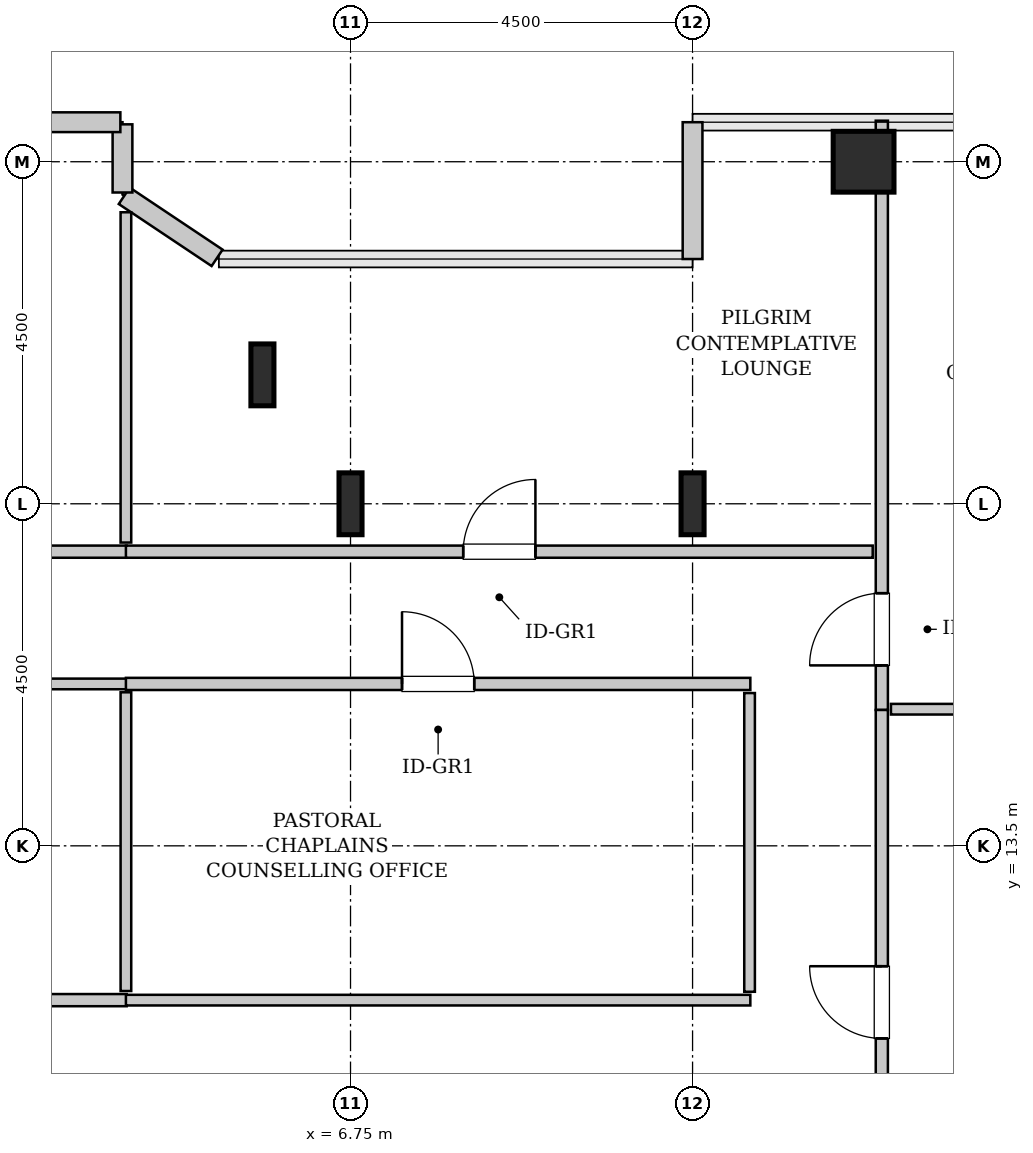
"""IFC4 building model, lengths in metres.
Left out: names, types, materials, properties, quantities, classifications, styles, units other than length and angle.
Written with IfcOpenShell. Run it as: python <this file> out.ifc"""

import sys

from ifc_helpers import new_model, si_unit, direction, frame, frame_2d, origin, origin_2d, place, context, subcontext, project, spatial, rectangle, hollow_rectangle, i_section, extrude, source, transform, mapped, element, fill, save


model = new_model("IFC4")
c1 = context("Model", 3, precision=1e-05, world=origin(), true_north=direction((0.0, 1.0)))
c2 = subcontext(c1, "Body", "Model", "MODEL_VIEW")
j1 = project(units=[si_unit("LENGTHUNIT", "METRE"), si_unit("PLANEANGLEUNIT", "RADIAN")], contexts=[c1])
p1 = place(None, origin())
s1 = spatial("IfcSite", under=j1, at=p1, CompositionType="ELEMENT")
p2 = place(p1, origin())
s2 = spatial("IfcBuilding", under=s1, at=p2, CompositionType="ELEMENT")
p3 = place(p2, frame((0.0, 0.0, 198.2)))
s3 = spatial("IfcBuildingStorey", under=s2, at=p3, CompositionType="ELEMENT", Elevation=198.2)
m1 = source(origin(), c2, "Body", "SweptSolid", [
    extrude(i_section(OverallWidth=0.303, OverallDepth=0.814, WebThickness=0.021, FlangeThickness=0.04, FilletRadius=0.03, at=origin_2d()), origin(), (0.0, 0.0, 1.0), 3.8),
])
for number, where, z_axis, x_axis in (
    (1, (5.591, 19.696, 0.0), (0.0, 0.0, 1.0), (1.0, 0.0, 0.0)),
    (2, (6.75, 18.0, 0.0), (0.0, 0.0, 1.0), (1.0, 0.0, 0.0)),
    (3, (11.25, 18.0, 0.0), (0.0, 0.0, 1.0), (1.0, 0.0, 0.0)),
):
    element("IfcColumn", number, at=place(p3, frame(where, z_axis=z_axis, x_axis=x_axis)), inside=s3, PredefinedType="COLUMN", context=c2, shape_type="MappedRepresentation", body=[
        mapped(m1, transform((0.0, 0.0, 0.0), x_axis=(1.0, 0.0, 0.0), y_axis=(0.0, 1.0, 0.0), z_axis=(0.0, 0.0, 1.0), scale=1.0)),
    ])
m2 = source(origin(), c2, "Body", "SweptSolid", [
    extrude(hollow_rectangle(XDim=0.8, YDim=0.8, WallThickness=0.04, InnerFilletRadius=0.04, OuterFilletRadius=0.08, at=origin_2d()), origin(), (0.0, 0.0, 1.0), 3.8),
])
p4 = place(p3, frame((13.5, 22.5, 0.0), z_axis=(0.0, 0.0, 1.0), x_axis=(1.0, 0.0, 0.0)))
e4 = element("IfcColumn", 4, at=p4, inside=s3, PredefinedType="COLUMN", context=c2, shape_type="MappedRepresentation", body=[
    mapped(m2, transform((0.0, 0.0, 0.0), x_axis=(1.0, 0.0, 0.0), y_axis=(0.0, 1.0, 0.0), z_axis=(0.0, 0.0, 1.0), scale=1.0)),
])
m3 = source(origin(), c2, "Body", "SweptSolid", [
    extrude(rectangle(XDim=1.8, YDim=0.26, at=frame_2d((0.9, 0.0))), origin(), (0.0, 0.0, 1.0), 3.5),
])
p5 = place(p3, frame((11.25, 23.02, 0.0), z_axis=(0.0, 0.0, 1.0), x_axis=(0.0, -1.0, 0.0)))
e5 = element("IfcWall", 5, at=p5, inside=s3, PredefinedType="SOLIDWALL", context=c2, shape_type="MappedRepresentation", body=[
    mapped(m3, transform((0.0, 0.0, 0.0), x_axis=(1.0, 0.0, 0.0), y_axis=(0.0, 1.0, 0.0), z_axis=(0.0, 0.0, 1.0), scale=1.0)),
])
m4 = source(origin(), c2, "Body", "SweptSolid", [
    extrude(rectangle(XDim=1.469, YDim=0.26, at=frame_2d((0.734, 0.0))), origin(), (0.0, 0.0, 1.0), 3.5),
])
p6 = place(p3, frame((4.995, 21.236, 0.0), z_axis=(0.0, 0.0, 1.0), x_axis=(-0.831461760506, 0.555581983884, 0.0)))
e6 = element("IfcWall", 6, at=p6, inside=s3, PredefinedType="SOLIDWALL", context=c2, shape_type="MappedRepresentation", body=[
    mapped(m4, transform((0.0, 0.0, 0.0), x_axis=(1.0, 0.0, 0.0), y_axis=(0.0, 1.0, 0.0), z_axis=(0.0, 0.0, 1.0), scale=1.0)),
])
m5 = source(origin(), c2, "Body", "SweptSolid", [
    extrude(rectangle(XDim=0.897, YDim=0.26, at=frame_2d((0.448, 0.0))), origin(), (0.0, 0.0, 1.0), 3.5),
])
p7 = place(p3, frame((3.75, 22.095, 0.0), z_axis=(0.0, 0.0, 1.0), x_axis=(0.0, 1.0, 0.0)))
e7 = element("IfcWall", 7, at=p7, inside=s3, PredefinedType="SOLIDWALL", context=c2, shape_type="MappedRepresentation", body=[
    mapped(m5, transform((0.0, 0.0, 0.0), x_axis=(1.0, 0.0, 0.0), y_axis=(0.0, 1.0, 0.0), z_axis=(0.0, 0.0, 1.0), scale=1.0)),
])
m6 = source(origin(), c2, "Body", "SweptSolid", [
    extrude(rectangle(XDim=1.37, YDim=0.26, at=frame_2d((0.685, 0.0))), origin(), (0.0, 0.0, 1.0), 3.5),
])
p8 = place(p3, frame((3.722, 23.02, 0.0), z_axis=(0.0, 0.0, 1.0), x_axis=(-1.0, 0.0, 0.0)))
e8 = element("IfcWall", 8, at=p8, inside=s3, PredefinedType="SOLIDWALL", context=c2, shape_type="MappedRepresentation", body=[
    mapped(m6, transform((0.0, 0.0, 0.0), x_axis=(1.0, 0.0, 0.0), y_axis=(0.0, 1.0, 0.0), z_axis=(0.0, 0.0, 1.0), scale=1.0)),
])
m7 = source(origin(), c2, "Body", "SweptSolid", [
    extrude(rectangle(XDim=7.752, YDim=0.16, at=frame_2d((3.876, 0.0))), origin(), (0.0, 0.0, 1.0), 3.485),
])
p9 = place(p3, frame((13.74, 15.288, 0.0), z_axis=(0.0, 0.0, 1.0), x_axis=(0.0, 1.0, 0.0)))
e9 = element("IfcWall", 9, at=p9, inside=s3, PredefinedType="PARTITIONING", context=c2, shape_type="MappedRepresentation", body=[
    mapped(m7, transform((0.0, 0.0, 0.0), x_axis=(1.0, 0.0, 0.0), y_axis=(0.0, 1.0, 0.0), z_axis=(0.0, 0.0, 1.0), scale=1.0)),
])
p10 = place(p9, frame((0.586, 0.0, 0.0)))
e10 = element("IfcOpeningElement", 10, at=p10, cuts=e9, PredefinedType="OPENING", context=c2, shape_type="SweptSolid", body=[
    extrude(rectangle(XDim=0.95, YDim=2.1, at=frame_2d((0.475, 1.05))), frame((0.0, 0.09, 0.0), z_axis=(0.0, -1.0, 0.0), x_axis=(1.0, 0.0, 0.0)), (0.0, 0.0, 1.0), 0.18),
])
m8 = source(origin(), c2, "Body", "SweptSolid", [
    extrude(rectangle(XDim=11.43, YDim=0.14, at=frame_2d((5.715, 0.0))), origin(), (0.0, 0.0, 1.0), 3.485),
])
p11 = place(p3, frame((13.86, 15.298, 0.0), z_axis=(0.0, 0.0, 1.0), x_axis=(1.0, 0.0, 0.0)))
e11 = element("IfcWall", 11, at=p11, inside=s3, PredefinedType="PARTITIONING", context=c2, shape_type="MappedRepresentation", body=[
    mapped(m8, transform((0.0, 0.0, 0.0), x_axis=(1.0, 0.0, 0.0), y_axis=(0.0, 1.0, 0.0), z_axis=(0.0, 0.0, 1.0), scale=1.0)),
])
m9 = source(origin(), c2, "Body", "SweptSolid", [
    extrude(rectangle(XDim=7.693, YDim=0.16, at=frame_2d((3.846, 0.0))), origin(), (0.0, 0.0, 1.0), 3.485),
])
p12 = place(p3, frame((13.74, 7.595, 0.0), z_axis=(0.0, 0.0, 1.0), x_axis=(0.0, 1.0, 0.0)))
e12 = element("IfcWall", 12, at=p12, inside=s3, PredefinedType="PARTITIONING", context=c2, shape_type="MappedRepresentation", body=[
    mapped(m9, transform((0.0, 0.0, 0.0), x_axis=(1.0, 0.0, 0.0), y_axis=(0.0, 1.0, 0.0), z_axis=(0.0, 0.0, 1.0), scale=1.0)),
])
p13 = place(p12, frame((3.371, 0.0, 0.0)))
e13 = element("IfcOpeningElement", 13, at=p13, cuts=e12, PredefinedType="OPENING", context=c2, shape_type="SweptSolid", body=[
    extrude(rectangle(XDim=0.95, YDim=2.1, at=frame_2d((0.475, 1.05))), frame((0.0, 0.09, 0.0), z_axis=(0.0, -1.0, 0.0), x_axis=(1.0, 0.0, 0.0)), (0.0, 0.0, 1.0), 0.18),
])
m10 = source(origin(), c2, "Body", "SweptSolid", [
    extrude(rectangle(XDim=15.815, YDim=0.16, at=frame_2d((7.907, 0.0))), origin(), (0.0, 0.0, 1.0), 3.485),
])
p14 = place(p3, frame((-12.01, 11.47, 0.0), z_axis=(0.0, 0.0, 1.0), x_axis=(1.0, 0.0, 0.0)))
e14 = element("IfcWall", 14, at=p14, inside=s3, PredefinedType="PARTITIONING", context=c2, shape_type="MappedRepresentation", body=[
    mapped(m10, transform((0.0, 0.0, 0.0), x_axis=(1.0, 0.0, 0.0), y_axis=(0.0, 1.0, 0.0), z_axis=(0.0, 0.0, 1.0), scale=1.0)),
])
p15 = place(p14, frame((7.433, 0.0, 0.0)))
e15 = element("IfcOpeningElement", 15, at=p15, cuts=e14, PredefinedType="OPENING", context=c2, shape_type="SweptSolid", body=[
    extrude(rectangle(XDim=0.95, YDim=2.1, at=frame_2d((0.475, 1.05))), frame((0.0, 0.09, 0.0), z_axis=(0.0, -1.0, 0.0), x_axis=(1.0, 0.0, 0.0)), (0.0, 0.0, 1.0), 0.18),
])
m11 = source(origin(), c2, "Body", "SweptSolid", [
    extrude(rectangle(XDim=15.815, YDim=0.14, at=frame_2d((7.907, 0.0))), origin(), (0.0, 0.0, 1.0), 3.485),
])
p16 = place(p3, frame((-12.01, 15.63, 0.0), z_axis=(0.0, 0.0, 1.0), x_axis=(1.0, 0.0, 0.0)))
e16 = element("IfcWall", 16, at=p16, inside=s3, PredefinedType="PARTITIONING", context=c2, shape_type="MappedRepresentation", body=[
    mapped(m11, transform((0.0, 0.0, 0.0), x_axis=(1.0, 0.0, 0.0), y_axis=(0.0, 1.0, 0.0), z_axis=(0.0, 0.0, 1.0), scale=1.0)),
])
m12 = source(origin(), c2, "Body", "SweptSolid", [
    extrude(rectangle(XDim=3.93, YDim=0.14, at=frame_2d((1.965, 0.0))), origin(), (0.0, 0.0, 1.0), 3.485),
])
p17 = place(p3, frame((3.795, 11.59, 0.0), z_axis=(0.0, 0.0, 1.0), x_axis=(0.0, 1.0, 0.0)))
e17 = element("IfcWall", 17, at=p17, inside=s3, PredefinedType="PARTITIONING", context=c2, shape_type="MappedRepresentation", body=[
    mapped(m12, transform((0.0, 0.0, 0.0), x_axis=(1.0, 0.0, 0.0), y_axis=(0.0, 1.0, 0.0), z_axis=(0.0, 0.0, 1.0), scale=1.0)),
])
m13 = source(origin(), c2, "Body", "SweptSolid", [
    extrude(rectangle(XDim=11.245, YDim=0.16, at=frame_2d((5.623, 0.0))), origin(), (0.0, 0.0, 1.0), 3.485),
])
p18 = place(p3, frame((-7.44, 17.37, 0.0), z_axis=(0.0, 0.0, 1.0), x_axis=(1.0, 0.0, 0.0)))
e18 = element("IfcWall", 18, at=p18, inside=s3, PredefinedType="PARTITIONING", context=c2, shape_type="MappedRepresentation", body=[
    mapped(m13, transform((0.0, 0.0, 0.0), x_axis=(1.0, 0.0, 0.0), y_axis=(0.0, 1.0, 0.0), z_axis=(0.0, 0.0, 1.0), scale=1.0)),
])
p19 = place(p18, frame((5.926, 0.0, 0.0)))
e19 = element("IfcOpeningElement", 19, at=p19, cuts=e18, PredefinedType="OPENING", context=c2, shape_type="SweptSolid", body=[
    extrude(rectangle(XDim=0.95, YDim=2.1, at=frame_2d((0.475, 1.05))), frame((0.0, 0.09, 0.0), z_axis=(0.0, -1.0, 0.0), x_axis=(1.0, 0.0, 0.0)), (0.0, 0.0, 1.0), 0.18),
])
m14 = source(origin(), c2, "Body", "SweptSolid", [
    extrude(rectangle(XDim=4.345, YDim=0.14, at=frame_2d((2.173, 0.0))), origin(), (0.0, 0.0, 1.0), 3.485),
])
p20 = place(p3, frame((3.795, 17.49, 0.0), z_axis=(0.0, 0.0, 1.0), x_axis=(0.0, 1.0, 0.0)))
e20 = element("IfcWall", 20, at=p20, inside=s3, PredefinedType="PARTITIONING", context=c2, shape_type="MappedRepresentation", body=[
    mapped(m14, transform((0.0, 0.0, 0.0), x_axis=(1.0, 0.0, 0.0), y_axis=(0.0, 1.0, 0.0), z_axis=(0.0, 0.0, 1.0), scale=1.0)),
])
m15 = source(origin(), c2, "Body", "SweptSolid", [
    extrude(rectangle(XDim=9.825, YDim=0.16, at=frame_2d((4.913, 0.0))), origin(), (0.0, 0.0, 1.0), 3.485),
])
p21 = place(p3, frame((3.795, 17.37, 0.0), z_axis=(0.0, 0.0, 1.0), x_axis=(1.0, 0.0, 0.0)))
e21 = element("IfcWall", 21, at=p21, inside=s3, PredefinedType="PARTITIONING", context=c2, shape_type="MappedRepresentation", body=[
    mapped(m15, transform((0.0, 0.0, 0.0), x_axis=(1.0, 0.0, 0.0), y_axis=(0.0, 1.0, 0.0), z_axis=(0.0, 0.0, 1.0), scale=1.0)),
])
p22 = place(p21, frame((4.438, 0.0, 0.0)))
e22 = element("IfcOpeningElement", 22, at=p22, cuts=e21, PredefinedType="OPENING", context=c2, shape_type="SweptSolid", body=[
    extrude(rectangle(XDim=0.95, YDim=2.1, at=frame_2d((0.475, 1.05))), frame((0.0, 0.09, 0.0), z_axis=(0.0, -1.0, 0.0), x_axis=(1.0, 0.0, 0.0)), (0.0, 0.0, 1.0), 0.18),
])
m16 = source(origin(), c2, "Body", "SweptSolid", [
    extrude(rectangle(XDim=8.215, YDim=0.16, at=frame_2d((4.107, 0.0))), origin(), (0.0, 0.0, 1.0), 3.485),
])
p23 = place(p3, frame((3.795, 15.63, 0.0), z_axis=(0.0, 0.0, 1.0), x_axis=(1.0, 0.0, 0.0)))
e23 = element("IfcWall", 23, at=p23, inside=s3, PredefinedType="PARTITIONING", context=c2, shape_type="MappedRepresentation", body=[
    mapped(m16, transform((0.0, 0.0, 0.0), x_axis=(1.0, 0.0, 0.0), y_axis=(0.0, 1.0, 0.0), z_axis=(0.0, 0.0, 1.0), scale=1.0)),
])
p24 = place(p23, frame((3.633, 0.0, 0.0)))
e24 = element("IfcOpeningElement", 24, at=p24, cuts=e23, PredefinedType="OPENING", context=c2, shape_type="SweptSolid", body=[
    extrude(rectangle(XDim=0.95, YDim=2.1, at=frame_2d((0.475, 1.05))), frame((0.0, 0.09, 0.0), z_axis=(0.0, -1.0, 0.0), x_axis=(1.0, 0.0, 0.0)), (0.0, 0.0, 1.0), 0.18),
])
m17 = source(origin(), c2, "Body", "SweptSolid", [
    extrude(rectangle(XDim=8.215, YDim=0.14, at=frame_2d((4.107, 0.0))), origin(), (0.0, 0.0, 1.0), 3.485),
])
p25 = place(p3, frame((3.795, 11.47, 0.0), z_axis=(0.0, 0.0, 1.0), x_axis=(1.0, 0.0, 0.0)))
e25 = element("IfcWall", 25, at=p25, inside=s3, PredefinedType="PARTITIONING", context=c2, shape_type="MappedRepresentation", body=[
    mapped(m17, transform((0.0, 0.0, 0.0), x_axis=(1.0, 0.0, 0.0), y_axis=(0.0, 1.0, 0.0), z_axis=(0.0, 0.0, 1.0), scale=1.0)),
])
p26 = place(p3, frame((12.0, 11.58, 0.0), z_axis=(0.0, 0.0, 1.0), x_axis=(0.0, 1.0, 0.0)))
e26 = element("IfcWall", 26, at=p26, inside=s3, PredefinedType="PARTITIONING", context=c2, shape_type="MappedRepresentation", body=[
    mapped(m12, transform((0.0, 0.0, 0.0), x_axis=(1.0, 0.0, 0.0), y_axis=(0.0, 1.0, 0.0), z_axis=(0.0, 0.0, 1.0), scale=1.0)),
])
m18 = source(origin(), c2, "Body", "SweptSolid", [
    extrude(rectangle(XDim=0.95, YDim=2.1, at=frame_2d((0.475, 1.05))), frame((0.0, 0.025, 0.0), z_axis=(0.0, -1.0, 0.0), x_axis=(1.0, 0.0, 0.0)), (0.0, 0.0, 1.0), 0.05),
])
p27 = place(p10, origin())
e27 = element("IfcDoor", 27, at=p27, inside=s3, OperationType="SINGLE_SWING_LEFT", PredefinedType="DOOR", context=c2, shape_type="MappedRepresentation", body=[
    mapped(m18, transform((0.0, 0.0, 0.0), x_axis=(1.0, 0.0, 0.0), y_axis=(0.0, 1.0, 0.0), z_axis=(0.0, 0.0, 1.0), scale=1.0)),
])
fill(e10, e27)
p28 = place(p13, origin())
e28 = element("IfcDoor", 28, at=p28, inside=s3, OperationType="SINGLE_SWING_RIGHT", PredefinedType="DOOR", context=c2, shape_type="MappedRepresentation", body=[
    mapped(m18, transform((0.0, 0.0, 0.0), x_axis=(1.0, 0.0, 0.0), y_axis=(0.0, 1.0, 0.0), z_axis=(0.0, 0.0, 1.0), scale=1.0)),
])
fill(e13, e28)
p29 = place(p22, origin())
e29 = element("IfcDoor", 29, at=p29, inside=s3, OperationType="SINGLE_SWING_RIGHT", PredefinedType="DOOR", context=c2, shape_type="MappedRepresentation", body=[
    mapped(m18, transform((0.0, 0.0, 0.0), x_axis=(1.0, 0.0, 0.0), y_axis=(0.0, 1.0, 0.0), z_axis=(0.0, 0.0, 1.0), scale=1.0)),
])
fill(e22, e29)
p30 = place(p24, origin())
e30 = element("IfcDoor", 30, at=p30, inside=s3, OperationType="SINGLE_SWING_LEFT", PredefinedType="DOOR", context=c2, shape_type="MappedRepresentation", body=[
    mapped(m18, transform((0.0, 0.0, 0.0), x_axis=(1.0, 0.0, 0.0), y_axis=(0.0, 1.0, 0.0), z_axis=(0.0, 0.0, 1.0), scale=1.0)),
])
fill(e24, e30)
save(model, sys.argv[1])
